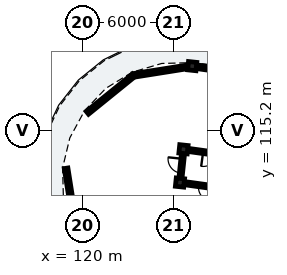
"""IFC4 building model, lengths in metres.
Left out: names, types, materials, properties, quantities, classifications, styles, units other than length and angle.
Written with IfcOpenShell. Run it as: python <this file> out.ifc"""

import sys

from ifc_helpers import new_model, si_unit, direction, frame, frame_2d, origin, origin_2d, place, context, subcontext, project, spatial, rectangle, extrude, element, fill, save


model = new_model("IFC4")
c1 = context("Model", 3, precision=1e-05, world=origin(), true_north=direction((0.0, 1.0)))
c2 = subcontext(c1, "Body", "Model", "MODEL_VIEW")
j1 = project(units=[si_unit("LENGTHUNIT", "METRE"), si_unit("PLANEANGLEUNIT", "RADIAN")], contexts=[c1])
p1 = place(None, origin())
s1 = spatial("IfcSite", under=j1, at=p1, CompositionType="ELEMENT")
p2 = place(p1, origin())
s2 = spatial("IfcBuilding", under=s1, at=p2, CompositionType="ELEMENT")
p3 = place(p2, frame((0.0, 0.0, 15.56)))
s3 = spatial("IfcBuildingStorey", under=s2, at=p3, CompositionType="ELEMENT", Elevation=15.56)
for number, where, z_axis, x_axis in (
    (1, (126.42, 111.766, 0.0), (0.0, 0.0, 1.0), (0.105, 0.995, 0.0)),
    (2, (126.65, 113.954, 0.0), (0.0, 0.0, 1.0), (0.105, 0.995, 0.0)),
    (3, (127.225, 119.424, 0.0), (0.0, 0.0, 1.0), (0.105, 0.995, 0.0)),
):
    element("IfcColumn", number, at=place(p3, frame(where, z_axis=z_axis, x_axis=x_axis)), inside=s3, PredefinedType="COLUMN", context=c2, shape_type="SweptSolid", body=[
        extrude(rectangle(XDim=0.55, YDim=0.55, at=origin_2d()), origin(), (0.0, 0.0, 1.0), 3.11),
    ])
p4 = place(p3, frame((130.955, 118.907, 0.0), z_axis=(0.0, 0.0, 1.0), x_axis=(-0.990539718913, 0.137226328578, 0.0)))
e4 = element("IfcWall", 4, at=p4, inside=s3, PredefinedType="SOLIDWALL", context=c2, shape_type="SweptSolid", body=[
    extrude(rectangle(XDim=3.521, YDim=0.24, at=frame_2d((1.76, 0.0))), origin(), (0.0, 0.0, 1.0), 2.355),
])
p5 = place(p4, frame((1.1, 0.0, 0.55)))
e5 = element("IfcOpeningElement", 5, at=p5, cuts=e4, PredefinedType="OPENING", context=c2, shape_type="SweptSolid", body=[
    extrude(rectangle(XDim=1.32, YDim=1.585, at=frame_2d((0.66, 0.792))), frame((0.0, 0.13, 0.0), z_axis=(0.0, -1.0, 0.0), x_axis=(1.0, 0.0, 0.0)), (0.0, 0.0, 1.0), 0.26),
])
p6 = place(p3, frame((119.538, 108.844, 0.0), z_axis=(0.0, 0.0, 1.0), x_axis=(-0.15648221771, 0.987680776132, 0.0)))
e6 = element("IfcWall", 6, at=p6, inside=s3, PredefinedType="SOLIDWALL", context=c2, shape_type="SweptSolid", body=[
    extrude(rectangle(XDim=3.908, YDim=0.24, at=frame_2d((1.954, 0.0))), origin(), (0.0, 0.0, 1.0), 2.355),
])
p7 = place(p6, frame((1.029, 0.0, 0.4)))
e7 = element("IfcOpeningElement", 7, at=p7, cuts=e6, PredefinedType="OPENING", context=c2, shape_type="SweptSolid", body=[
    extrude(rectangle(XDim=1.85, YDim=1.72, at=frame_2d((0.925, 0.86))), frame((0.0, 0.13, 0.0), z_axis=(0.0, -1.0, 0.0), x_axis=(1.0, 0.0, 0.0)), (0.0, 0.0, 1.0), 0.26),
])
p8 = place(p3, frame((120.327, 116.353, 0.0), z_axis=(0.0, 0.0, 1.0), x_axis=(0.777137204109, 0.629331205321, 0.0)))
e8 = element("IfcWall", 8, at=p8, inside=s3, PredefinedType="SOLIDWALL", context=c2, shape_type="SweptSolid", body=[
    extrude(rectangle(XDim=3.908, YDim=0.24, at=frame_2d((1.954, 0.0))), origin(), (0.0, 0.0, 1.0), 2.355),
])
p9 = place(p3, frame((123.365, 118.812, 0.0), z_axis=(0.0, 0.0, 1.0), x_axis=(0.987690429048, 0.156421278498, 0.0)))
e9 = element("IfcWall", 9, at=p9, inside=s3, PredefinedType="SOLIDWALL", context=c2, shape_type="SweptSolid", body=[
    extrude(rectangle(XDim=3.908, YDim=0.24, at=frame_2d((1.954, 0.0))), origin(), (0.0, 0.0, 1.0), 2.355),
])
p10 = place(p9, frame((1.029, 0.0, 0.4)))
e10 = element("IfcOpeningElement", 10, at=p10, cuts=e9, PredefinedType="OPENING", context=c2, shape_type="SweptSolid", body=[
    extrude(rectangle(XDim=1.85, YDim=1.72, at=frame_2d((0.925, 0.86))), frame((0.0, 0.13, 0.0), z_axis=(0.0, -1.0, 0.0), x_axis=(1.0, 0.0, 0.0)), (0.0, 0.0, 1.0), 0.26),
])
p11 = place(p3, frame((129.833, 113.513, 0.0), z_axis=(0.0, 0.0, 1.0), x_axis=(-0.990544162976, 0.137194246211, 0.0)))
e11 = element("IfcWall", 11, at=p11, inside=s3, PredefinedType="PARTITIONING", context=c2, shape_type="SweptSolid", body=[
    extrude(rectangle(XDim=2.863, YDim=0.205, at=frame_2d((1.432, 0.0))), origin(), (0.0, 0.0, 1.0), 2.37),
])
p12 = place(p11, frame((0.957, 0.0, 0.0)))
e12 = element("IfcOpeningElement", 12, at=p12, cuts=e11, PredefinedType="OPENING", context=c2, shape_type="SweptSolid", body=[
    extrude(rectangle(XDim=0.95, YDim=2.13, at=frame_2d((0.475, 1.065))), frame((0.0, 0.113, 0.0), z_axis=(0.0, -1.0, 0.0), x_axis=(1.0, 0.0, 0.0)), (0.0, 0.0, 1.0), 0.225),
])
p13 = place(p3, frame((129.459, 111.345, 0.0), z_axis=(0.0, 0.0, 1.0), x_axis=(-0.990535404475, 0.137257467855, 0.0)))
e13 = element("IfcWall", 13, at=p13, inside=s3, PredefinedType="PARTITIONING", context=c2, shape_type="SweptSolid", body=[
    extrude(rectangle(XDim=2.718, YDim=0.205, at=frame_2d((1.359, 0.0))), origin(), (0.0, 0.0, 1.0), 2.37),
])
p14 = place(p13, frame((0.884, 0.0, 0.0)))
e14 = element("IfcOpeningElement", 14, at=p14, cuts=e13, PredefinedType="OPENING", context=c2, shape_type="SweptSolid", body=[
    extrude(rectangle(XDim=0.95, YDim=2.13, at=frame_2d((0.475, 1.065))), frame((0.0, 0.113, 0.0), z_axis=(0.0, -1.0, 0.0), x_axis=(1.0, 0.0, 0.0)), (0.0, 0.0, 1.0), 0.225),
])
p15 = place(p3, frame((126.425, 111.816, 0.0), z_axis=(0.0, 0.0, 1.0), x_axis=(0.104509292252, 0.994523910136, 0.0)))
e15 = element("IfcWall", 15, at=p15, inside=s3, PredefinedType="PARTITIONING", context=c2, shape_type="SweptSolid", body=[
    extrude(rectangle(XDim=2.1, YDim=0.205, at=frame_2d((1.05, 0.0))), origin(), (0.0, 0.0, 1.0), 2.37),
])
p16 = place(p15, frame((0.57, 0.0, 0.0)))
e16 = element("IfcOpeningElement", 16, at=p16, cuts=e15, PredefinedType="OPENING", context=c2, shape_type="SweptSolid", body=[
    extrude(rectangle(XDim=0.95, YDim=2.13, at=frame_2d((0.475, 1.065))), frame((0.0, 0.113, 0.0), z_axis=(0.0, -1.0, 0.0), x_axis=(1.0, 0.0, 0.0)), (0.0, 0.0, 1.0), 0.225),
])
p17 = place(p7, origin())
e17 = element("IfcWindow", 17, at=p17, inside=s3, PartitioningType="SINGLE_PANEL", PredefinedType="WINDOW", context=c2, shape_type="SweptSolid", body=[
    extrude(rectangle(XDim=1.85, YDim=1.72, at=frame_2d((0.925, 0.86))), frame((0.0, 0.03, 0.0), z_axis=(0.0, -1.0, 0.0), x_axis=(1.0, 0.0, 0.0)), (0.0, 0.0, 1.0), 0.06),
])
fill(e7, e17)
p18 = place(p10, origin())
e18 = element("IfcWindow", 18, at=p18, inside=s3, PartitioningType="SINGLE_PANEL", PredefinedType="WINDOW", context=c2, shape_type="SweptSolid", body=[
    extrude(rectangle(XDim=1.85, YDim=1.72, at=frame_2d((0.925, 0.86))), frame((0.0, 0.03, 0.0), z_axis=(0.0, -1.0, 0.0), x_axis=(1.0, 0.0, 0.0)), (0.0, 0.0, 1.0), 0.06),
])
fill(e10, e18)
p19 = place(p12, origin())
e19 = element("IfcDoor", 19, at=p19, inside=s3, OperationType="SINGLE_SWING_RIGHT", PredefinedType="DOOR", context=c2, shape_type="SweptSolid", body=[
    extrude(rectangle(XDim=0.95, YDim=2.13, at=frame_2d((0.475, 1.065))), frame((0.0, 0.025, 0.0), z_axis=(0.0, -1.0, 0.0), x_axis=(1.0, 0.0, 0.0)), (0.0, 0.0, 1.0), 0.05),
])
fill(e12, e19)
p20 = place(p14, origin())
e20 = element("IfcDoor", 20, at=p20, inside=s3, OperationType="SINGLE_SWING_LEFT", PredefinedType="DOOR", context=c2, shape_type="SweptSolid", body=[
    extrude(rectangle(XDim=0.95, YDim=2.13, at=frame_2d((0.475, 1.065))), frame((0.0, 0.025, 0.0), z_axis=(0.0, -1.0, 0.0), x_axis=(1.0, 0.0, 0.0)), (0.0, 0.0, 1.0), 0.05),
])
fill(e14, e20)
p21 = place(p16, origin())
e21 = element("IfcDoor", 21, at=p21, inside=s3, OperationType="SINGLE_SWING_RIGHT", PredefinedType="DOOR", context=c2, shape_type="SweptSolid", body=[
    extrude(rectangle(XDim=0.95, YDim=2.13, at=frame_2d((0.475, 1.065))), frame((0.0, 0.025, 0.0), z_axis=(0.0, -1.0, 0.0), x_axis=(1.0, 0.0, 0.0)), (0.0, 0.0, 1.0), 0.05),
])
fill(e16, e21)
save(model, sys.argv[1])
